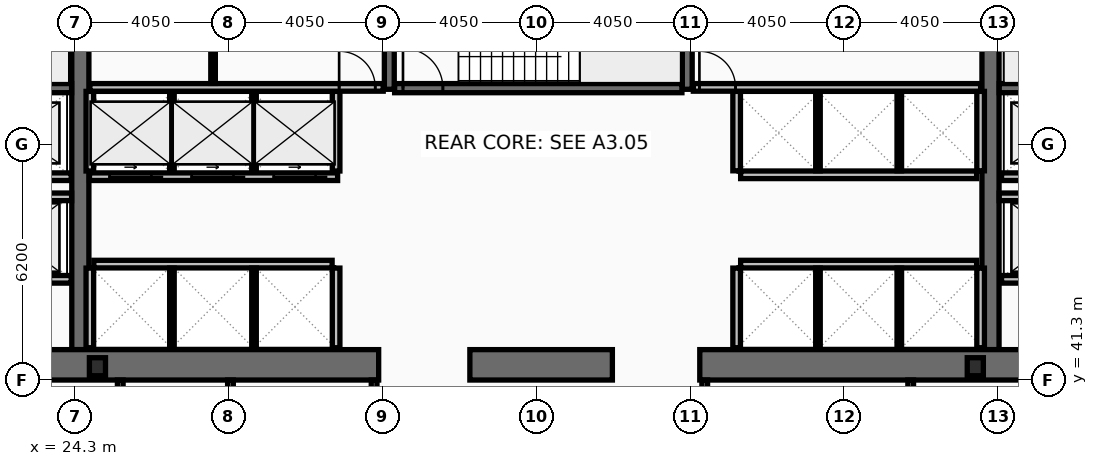
"""IFC4 building model, lengths in metres.
Left out: names, types, materials, properties, quantities, classifications, styles, units other than length and angle.
Written with IfcOpenShell. Run it as: python <this file> out.ifc"""

import sys

from ifc_helpers import new_model, si_unit, direction, frame, frame_2d, origin, origin_2d, place, context, subcontext, project, spatial, rectangle, i_section, extrude, element, fill, save


model = new_model("IFC4")
c1 = context("Model", 3, precision=1e-05, world=origin(), true_north=direction((0.0, 1.0)))
c2 = subcontext(c1, "Body", "Model", "MODEL_VIEW")
j1 = project(units=[si_unit("LENGTHUNIT", "METRE"), si_unit("PLANEANGLEUNIT", "RADIAN")], contexts=[c1])
p1 = place(None, origin())
s1 = spatial("IfcSite", under=j1, at=p1, CompositionType="ELEMENT")
p2 = place(p1, origin())
s2 = spatial("IfcBuilding", under=s1, at=p2, CompositionType="ELEMENT")
p3 = place(p2, frame((0.0, 0.0, 81.8)))
s3 = spatial("IfcBuildingStorey", under=s2, at=p3, CompositionType="ELEMENT", Elevation=81.8)
for number, where, z_axis, x_axis in (
    (1, (24.45, 42.1, 0.0), (0.0, 0.0, 1.0), (0.0, 1.0, 0.0)),
    (2, (48.4, 42.1, 0.0), (0.0, 0.0, 1.0), (0.0, 1.0, 0.0)),
):
    element("IfcWall", number, at=place(p3, frame(where, z_axis=z_axis, x_axis=x_axis)), inside=s3, PredefinedType="SHEAR", context=c2, shape_type="SweptSolid", body=[
        extrude(rectangle(XDim=10.8, YDim=0.45, at=frame_2d((5.4, 0.0))), origin(), (0.0, 0.0, 1.0), 3.78),
    ])
p4 = place(p3, frame((32.3, 41.7, 0.0), z_axis=(0.0, 0.0, 1.0), x_axis=(-1.0, 0.0, 0.0)))
e3 = element("IfcWall", 3, at=p4, inside=s3, PredefinedType="SHEAR", context=c2, shape_type="SweptSolid", body=[
    extrude(rectangle(XDim=11.45, YDim=0.8, at=frame_2d((5.725, 0.0))), origin(), (0.0, 0.0, 1.0), 3.78),
])
p5 = place(p3, frame((38.45, 41.7, 0.0), z_axis=(0.0, 0.0, 1.0), x_axis=(-1.0, 0.0, 0.0)))
e4 = element("IfcWall", 4, at=p5, inside=s3, PredefinedType="SHEAR", context=c2, shape_type="SweptSolid", body=[
    extrude(rectangle(XDim=3.75, YDim=0.8, at=frame_2d((1.875, 0.0))), origin(), (0.0, 0.0, 1.0), 3.78),
])
p6 = place(p3, frame((52.05, 41.7, 0.0), z_axis=(0.0, 0.0, 1.0), x_axis=(-1.0, 0.0, 0.0)))
e5 = element("IfcWall", 5, at=p6, inside=s3, PredefinedType="SHEAR", context=c2, shape_type="SweptSolid", body=[
    extrude(rectangle(XDim=11.3, YDim=0.8, at=frame_2d((5.65, 0.0))), origin(), (0.0, 0.0, 1.0), 3.78),
])
for number, where, z_axis, x_axis in (
    (6, (32.58, 48.95, 0.0), (0.0, 0.0, 1.0), (0.0, 1.0, 0.0)),
    (7, (40.42, 48.95, 0.0), (0.0, 0.0, 1.0), (0.0, 1.0, 0.0)),
):
    element("IfcWall", number, at=place(p3, frame(where, z_axis=z_axis, x_axis=x_axis)), inside=s3, PredefinedType="SHEAR", context=c2, shape_type="SweptSolid", body=[
        extrude(rectangle(XDim=3.95, YDim=0.26, at=frame_2d((1.975, 0.0))), origin(), (0.0, 0.0, 1.0), 3.78),
    ])
p7 = place(p3, frame((17.0, 48.98, 0.0), z_axis=(0.0, 0.0, 1.0), x_axis=(1.0, 0.0, 0.0)))
e8 = element("IfcWall", 8, at=p7, inside=s3, PredefinedType="SHEAR", context=c2, shape_type="SweptSolid", body=[
    extrude(rectangle(XDim=7.22, YDim=0.24, at=frame_2d((3.61, 0.0))), origin(), (0.0, 0.0, 1.0), 3.78),
])
p8 = place(p7, frame((0.22, 0.0, 0.0)))
e9 = element("IfcOpeningElement", 9, at=p8, cuts=e8, PredefinedType="OPENING", context=c2, shape_type="SweptSolid", body=[
    extrude(rectangle(XDim=1.05, YDim=2.15, at=frame_2d((0.525, 1.075))), frame((0.0, 0.13, 0.0), z_axis=(0.0, -1.0, 0.0), x_axis=(1.0, 0.0, 0.0)), (0.0, 0.0, 1.0), 0.26),
])
p9 = place(p3, frame((48.63, 48.98, 0.0), z_axis=(0.0, 0.0, 1.0), x_axis=(1.0, 0.0, 0.0)))
e10 = element("IfcWall", 10, at=p9, inside=s3, PredefinedType="SHEAR", context=c2, shape_type="SweptSolid", body=[
    extrude(rectangle(XDim=7.27, YDim=0.24, at=frame_2d((3.635, 0.0))), origin(), (0.0, 0.0, 1.0), 3.78),
])
p10 = place(p9, frame((6.0, 0.0, 0.0)))
e11 = element("IfcOpeningElement", 11, at=p10, cuts=e10, PredefinedType="OPENING", context=c2, shape_type="SweptSolid", body=[
    extrude(rectangle(XDim=1.05, YDim=2.15, at=frame_2d((0.525, 1.075))), frame((0.0, 0.13, 0.0), z_axis=(0.0, -1.0, 0.0), x_axis=(1.0, 0.0, 0.0)), (0.0, 0.0, 1.0), 0.26),
])
p11 = place(p3, frame((32.72, 48.98, 0.0), z_axis=(0.0, 0.0, 1.0), x_axis=(1.0, 0.0, 0.0)))
e12 = element("IfcWall", 12, at=p11, inside=s3, PredefinedType="SHEAR", context=c2, shape_type="SweptSolid", body=[
    extrude(rectangle(XDim=7.56, YDim=0.24, at=frame_2d((3.78, 0.0))), origin(), (0.0, 0.0, 1.0), 3.78),
])
p12 = place(p11, frame((0.22, 0.0, 0.0)))
e13 = element("IfcOpeningElement", 13, at=p12, cuts=e12, PredefinedType="OPENING", context=c2, shape_type="SweptSolid", body=[
    extrude(rectangle(XDim=1.05, YDim=2.15, at=frame_2d((0.525, 1.075))), frame((0.0, 0.13, 0.0), z_axis=(0.0, -1.0, 0.0), x_axis=(1.0, 0.0, 0.0)), (0.0, 0.0, 1.0), 0.26),
])
for number, where, z_axis, x_axis in (
    (14, (24.9, 41.65, 0.0), (0.0, 0.0, 1.0), (1.0, 0.0, 0.0)),
    (15, (48.0, 41.65, 0.0), (0.0, 0.0, 1.0), (1.0, 0.0, 0.0)),
):
    element("IfcColumn", number, at=place(p3, frame(where, z_axis=z_axis, x_axis=x_axis)), inside=s3, PredefinedType="COLUMN", context=c2, shape_type="SweptSolid", body=[
        extrude(i_section(OverallWidth=0.424, OverallDepth=0.474, WebThickness=0.048, FlangeThickness=0.077, at=origin_2d()), origin(), (0.0, 0.0, 1.0), 4.0),
    ])
p13 = place(p3, frame((51.61, 43.95, 0.0), z_axis=(0.0, 0.0, 1.0), x_axis=(-1.0, 0.0, 0.0)))
e16 = element("IfcWall", 16, at=p13, inside=s3, PredefinedType="PARTITIONING", context=c2, shape_type="SweptSolid", body=[
    extrude(rectangle(XDim=2.92, YDim=0.2, at=frame_2d((1.46, 0.0))), origin(), (0.0, 0.0, 1.0), 3.78),
])
p14 = place(p13, frame((0.81, 0.0, 0.0)))
e17 = element("IfcOpeningElement", 17, at=p14, cuts=e16, PredefinedType="OPENING", context=c2, shape_type="SweptSolid", body=[
    extrude(rectangle(XDim=1.3, YDim=2.18, at=frame_2d((0.65, 1.09))), frame((0.0, 0.11, 0.0), z_axis=(0.0, -1.0, 0.0), x_axis=(1.0, 0.0, 0.0)), (0.0, 0.0, 1.0), 0.22),
])
p15 = place(p3, frame((24.21, 43.95, 0.0), z_axis=(0.0, 0.0, 1.0), x_axis=(-1.0, 0.0, 0.0)))
e18 = element("IfcWall", 18, at=p15, inside=s3, PredefinedType="PARTITIONING", context=c2, shape_type="SweptSolid", body=[
    extrude(rectangle(XDim=2.97, YDim=0.2, at=frame_2d((1.485, 0.0))), origin(), (0.0, 0.0, 1.0), 3.78),
])
p16 = place(p15, frame((0.86, 0.0, 0.0)))
e19 = element("IfcOpeningElement", 19, at=p16, cuts=e18, PredefinedType="OPENING", context=c2, shape_type="SweptSolid", body=[
    extrude(rectangle(XDim=1.3, YDim=2.18, at=frame_2d((0.65, 1.09))), frame((0.0, 0.11, 0.0), z_axis=(0.0, -1.0, 0.0), x_axis=(1.0, 0.0, 0.0)), (0.0, 0.0, 1.0), 0.22),
])
p17 = place(p3, frame((51.61, 46.65, 0.0), z_axis=(0.0, 0.0, 1.0), x_axis=(-1.0, 0.0, 0.0)))
e20 = element("IfcWall", 20, at=p17, inside=s3, PredefinedType="PARTITIONING", context=c2, shape_type="SweptSolid", body=[
    extrude(rectangle(XDim=2.92, YDim=0.2, at=frame_2d((1.46, 0.0))), origin(), (0.0, 0.0, 1.0), 3.78),
])
p18 = place(p17, frame((0.86, 0.0, 0.0)))
e21 = element("IfcOpeningElement", 21, at=p18, cuts=e20, PredefinedType="OPENING", context=c2, shape_type="SweptSolid", body=[
    extrude(rectangle(XDim=1.2, YDim=2.18, at=frame_2d((0.6, 1.09))), frame((0.0, 0.11, 0.0), z_axis=(0.0, -1.0, 0.0), x_axis=(1.0, 0.0, 0.0)), (0.0, 0.0, 1.0), 0.22),
])
p19 = place(p3, frame((24.21, 46.65, 0.0), z_axis=(0.0, 0.0, 1.0), x_axis=(-1.0, 0.0, 0.0)))
e22 = element("IfcWall", 22, at=p19, inside=s3, PredefinedType="PARTITIONING", context=c2, shape_type="SweptSolid", body=[
    extrude(rectangle(XDim=2.97, YDim=0.2, at=frame_2d((1.485, 0.0))), origin(), (0.0, 0.0, 1.0), 3.78),
])
p20 = place(p19, frame((0.91, 0.0, 0.0)))
e23 = element("IfcOpeningElement", 23, at=p20, cuts=e22, PredefinedType="OPENING", context=c2, shape_type="SweptSolid", body=[
    extrude(rectangle(XDim=1.2, YDim=2.18, at=frame_2d((0.6, 1.09))), frame((0.0, 0.11, 0.0), z_axis=(0.0, -1.0, 0.0), x_axis=(1.0, 0.0, 0.0)), (0.0, 0.0, 1.0), 0.22),
])
p21 = place(p3, frame((31.22, 46.65, 0.0), z_axis=(0.0, 0.0, 1.0), x_axis=(-1.0, 0.0, 0.0)))
e24 = element("IfcWall", 24, at=p21, inside=s3, PredefinedType="PARTITIONING", context=c2, shape_type="SweptSolid", body=[
    extrude(rectangle(XDim=6.53, YDim=0.2, at=frame_2d((3.265, 0.0))), origin(), (0.0, 0.0, 1.0), 3.78),
])
p22 = place(p21, frame((4.9, 0.0, 0.0)))
e25 = element("IfcOpeningElement", 25, at=p22, cuts=e24, PredefinedType="OPENING", context=c2, shape_type="SweptSolid", body=[
    extrude(rectangle(XDim=1.1, YDim=2.18, at=frame_2d((0.55, 1.09))), frame((0.0, 0.11, 0.0), z_axis=(0.0, -1.0, 0.0), x_axis=(1.0, 0.0, 0.0)), (0.0, 0.0, 1.0), 0.22),
])
p23 = place(p21, frame((2.74, 0.0, 0.0)))
e26 = element("IfcOpeningElement", 26, at=p23, cuts=e24, PredefinedType="OPENING", context=c2, shape_type="SweptSolid", body=[
    extrude(rectangle(XDim=1.1, YDim=2.18, at=frame_2d((0.55, 1.09))), frame((0.0, 0.11, 0.0), z_axis=(0.0, -1.0, 0.0), x_axis=(1.0, 0.0, 0.0)), (0.0, 0.0, 1.0), 0.22),
])
p24 = place(p21, frame((0.58, 0.0, 0.0)))
e27 = element("IfcOpeningElement", 27, at=p24, cuts=e24, PredefinedType="OPENING", context=c2, shape_type="SweptSolid", body=[
    extrude(rectangle(XDim=1.1, YDim=2.18, at=frame_2d((0.55, 1.09))), frame((0.0, 0.11, 0.0), z_axis=(0.0, -1.0, 0.0), x_axis=(1.0, 0.0, 0.0)), (0.0, 0.0, 1.0), 0.22),
])
p25 = place(p3, frame((21.2, 46.12, 0.0), z_axis=(0.0, 0.0, 1.0), x_axis=(1.0, 0.0, 0.0)))
e28 = element("IfcWall", 28, at=p25, inside=s3, PredefinedType="PARTITIONING", context=c2, shape_type="SweptSolid", body=[
    extrude(rectangle(XDim=3.02, YDim=0.2, at=frame_2d((1.51, 0.0))), origin(), (0.0, 0.0, 1.0), 3.78),
])
p26 = place(p3, frame((48.63, 46.12, 0.0), z_axis=(0.0, 0.0, 1.0), x_axis=(1.0, 0.0, 0.0)))
e29 = element("IfcWall", 29, at=p26, inside=s3, PredefinedType="PARTITIONING", context=c2, shape_type="SweptSolid", body=[
    extrude(rectangle(XDim=3.07, YDim=0.2, at=frame_2d((1.535, 0.0))), origin(), (0.0, 0.0, 1.0), 3.78),
])
for number, where, z_axis, x_axis in (
    (30, (24.7, 46.8, 0.0), (0.0, 0.0, 1.0), (0.0, 1.0, 0.0)),
    (31, (31.18, 46.8, 0.0), (0.0, 0.0, 1.0), (0.0, 1.0, 0.0)),
):
    element("IfcWall", number, at=place(p3, frame(where, z_axis=z_axis, x_axis=x_axis)), inside=s3, PredefinedType="PARTITIONING", context=c2, shape_type="SweptSolid", body=[
        extrude(rectangle(XDim=2.095, YDim=0.2, at=frame_2d((1.047, 0.0))), origin(), (0.0, 0.0, 1.0), 3.78),
    ])
for number, where, z_axis, x_axis in (
    (32, (26.86, 46.8, 0.0), (0.0, 0.0, 1.0), (0.0, 1.0, 0.0)),
    (33, (29.02, 46.8, 0.0), (0.0, 0.0, 1.0), (0.0, 1.0, 0.0)),
):
    element("IfcWall", number, at=place(p3, frame(where, z_axis=z_axis, x_axis=x_axis)), inside=s3, PredefinedType="PARTITIONING", context=c2, shape_type="SweptSolid", body=[
        extrude(rectangle(XDim=2.095, YDim=0.12, at=frame_2d((1.047, 0.0))), origin(), (0.0, 0.0, 1.0), 3.78),
    ])
p27 = place(p3, frame((24.805, 44.35, 0.0), z_axis=(0.0, 0.0, 1.0), x_axis=(1.0, 0.0, 0.0)))
e34 = element("IfcWall", 34, at=p27, inside=s3, PredefinedType="PARTITIONING", context=c2, shape_type="SweptSolid", body=[
    extrude(rectangle(XDim=6.27, YDim=0.2, at=frame_2d((3.135, 0.0))), origin(), (0.0, 0.0, 1.0), 3.78),
])
for number, where, z_axis, x_axis in (
    (35, (24.7, 42.15, 0.0), (0.0, 0.0, 1.0), (0.0, 1.0, 0.0)),
    (36, (31.18, 42.15, 0.0), (0.0, 0.0, 1.0), (0.0, 1.0, 0.0)),
):
    element("IfcWall", number, at=place(p3, frame(where, z_axis=z_axis, x_axis=x_axis)), inside=s3, PredefinedType="PARTITIONING", context=c2, shape_type="SweptSolid", body=[
        extrude(rectangle(XDim=2.095, YDim=0.2, at=frame_2d((1.048, 0.0))), origin(), (0.0, 0.0, 1.0), 3.78),
    ])
for number, where, z_axis, x_axis in (
    (37, (26.86, 42.15, 0.0), (0.0, 0.0, 1.0), (0.0, 1.0, 0.0)),
    (38, (29.02, 42.15, 0.0), (0.0, 0.0, 1.0), (0.0, 1.0, 0.0)),
):
    element("IfcWall", number, at=place(p3, frame(where, z_axis=z_axis, x_axis=x_axis)), inside=s3, PredefinedType="PARTITIONING", context=c2, shape_type="SweptSolid", body=[
        extrude(rectangle(XDim=2.095, YDim=0.12, at=frame_2d((1.048, 0.0))), origin(), (0.0, 0.0, 1.0), 3.78),
    ])
p28 = place(p3, frame((41.825, 46.7, 0.0), z_axis=(0.0, 0.0, 1.0), x_axis=(1.0, 0.0, 0.0)))
e39 = element("IfcWall", 39, at=p28, inside=s3, PredefinedType="PARTITIONING", context=c2, shape_type="SweptSolid", body=[
    extrude(rectangle(XDim=6.21, YDim=0.2, at=frame_2d((3.105, 0.0))), origin(), (0.0, 0.0, 1.0), 3.78),
])
for number, where, z_axis, x_axis in (
    (40, (41.72, 46.805, 0.0), (0.0, 0.0, 1.0), (0.0, 1.0, 0.0)),
    (41, (48.14, 46.805, 0.0), (0.0, 0.0, 1.0), (0.0, 1.0, 0.0)),
):
    element("IfcWall", number, at=place(p3, frame(where, z_axis=z_axis, x_axis=x_axis)), inside=s3, PredefinedType="PARTITIONING", context=c2, shape_type="SweptSolid", body=[
        extrude(rectangle(XDim=2.09, YDim=0.2, at=frame_2d((1.045, 0.0))), origin(), (0.0, 0.0, 1.0), 3.78),
    ])
for number, where, z_axis, x_axis in (
    (42, (43.86, 46.805, 0.0), (0.0, 0.0, 1.0), (0.0, 1.0, 0.0)),
    (43, (46.0, 46.805, 0.0), (0.0, 0.0, 1.0), (0.0, 1.0, 0.0)),
):
    element("IfcWall", number, at=place(p3, frame(where, z_axis=z_axis, x_axis=x_axis)), inside=s3, PredefinedType="PARTITIONING", context=c2, shape_type="SweptSolid", body=[
        extrude(rectangle(XDim=2.09, YDim=0.12, at=frame_2d((1.045, 0.0))), origin(), (0.0, 0.0, 1.0), 3.78),
    ])
p29 = place(p3, frame((41.825, 44.35, 0.0), z_axis=(0.0, 0.0, 1.0), x_axis=(1.0, 0.0, 0.0)))
e44 = element("IfcWall", 44, at=p29, inside=s3, PredefinedType="PARTITIONING", context=c2, shape_type="SweptSolid", body=[
    extrude(rectangle(XDim=6.21, YDim=0.2, at=frame_2d((3.105, 0.0))), origin(), (0.0, 0.0, 1.0), 3.78),
])
for number, where, z_axis, x_axis in (
    (45, (41.72, 42.15, 0.0), (0.0, 0.0, 1.0), (0.0, 1.0, 0.0)),
    (46, (48.14, 42.15, 0.0), (0.0, 0.0, 1.0), (0.0, 1.0, 0.0)),
):
    element("IfcWall", number, at=place(p3, frame(where, z_axis=z_axis, x_axis=x_axis)), inside=s3, PredefinedType="PARTITIONING", context=c2, shape_type="SweptSolid", body=[
        extrude(rectangle(XDim=2.095, YDim=0.2, at=frame_2d((1.048, 0.0))), origin(), (0.0, 0.0, 1.0), 3.78),
    ])
for number, where, z_axis, x_axis in (
    (47, (43.86, 42.15, 0.0), (0.0, 0.0, 1.0), (0.0, 1.0, 0.0)),
    (48, (46.0, 42.15, 0.0), (0.0, 0.0, 1.0), (0.0, 1.0, 0.0)),
):
    element("IfcWall", number, at=place(p3, frame(where, z_axis=z_axis, x_axis=x_axis)), inside=s3, PredefinedType="PARTITIONING", context=c2, shape_type="SweptSolid", body=[
        extrude(rectangle(XDim=2.095, YDim=0.12, at=frame_2d((1.048, 0.0))), origin(), (0.0, 0.0, 1.0), 3.78),
    ])
p30 = place(p3, frame((24.7, 49.0, 0.0), z_axis=(0.0, 0.0, 1.0), x_axis=(1.0, 0.0, 0.0)))
e49 = element("IfcWall", 49, at=p30, inside=s3, PredefinedType="PARTITIONING", context=c2, shape_type="SweptSolid", body=[
    extrude(rectangle(XDim=7.72, YDim=0.2, at=frame_2d((3.86, 0.0))), origin(), (0.0, 0.0, 1.0), 3.78),
])
p31 = place(p30, frame((6.56, 0.0, 0.0)))
e50 = element("IfcOpeningElement", 50, at=p31, cuts=e49, PredefinedType="OPENING", context=c2, shape_type="SweptSolid", body=[
    extrude(rectangle(XDim=0.95, YDim=2.1, at=frame_2d((0.475, 1.05))), frame((0.0, 0.11, 0.0), z_axis=(0.0, -1.0, 0.0), x_axis=(1.0, 0.0, 0.0)), (0.0, 0.0, 1.0), 0.22),
])
p32 = place(p3, frame((27.942, 49.105, 0.0), z_axis=(0.0, 0.0, 1.0), x_axis=(0.0, 1.0, 0.0)))
e51 = element("IfcWall", 51, at=p32, inside=s3, PredefinedType="PARTITIONING", context=c2, shape_type="SweptSolid", body=[
    extrude(rectangle(XDim=3.69, YDim=0.12, at=frame_2d((1.845, 0.0))), origin(), (0.0, 0.0, 1.0), 3.78),
])
p33 = place(p32, frame((1.05, 0.0, 0.0)))
e52 = element("IfcOpeningElement", 52, at=p33, cuts=e51, PredefinedType="OPENING", context=c2, shape_type="SweptSolid", body=[
    extrude(rectangle(XDim=0.9, YDim=2.05, at=frame_2d((0.45, 1.025))), frame((0.0, 0.07, 0.0), z_axis=(0.0, -1.0, 0.0), x_axis=(1.0, 0.0, 0.0)), (0.0, 0.0, 1.0), 0.14),
])
p34 = place(p3, frame((40.58, 49.0, 0.0), z_axis=(0.0, 0.0, 1.0), x_axis=(1.0, 0.0, 0.0)))
e53 = element("IfcWall", 53, at=p34, inside=s3, PredefinedType="PARTITIONING", context=c2, shape_type="SweptSolid", body=[
    extrude(rectangle(XDim=7.56, YDim=0.2, at=frame_2d((3.78, 0.0))), origin(), (0.0, 0.0, 1.0), 3.78),
])
p35 = place(p34, frame((0.16, 0.0, 0.0)))
e54 = element("IfcOpeningElement", 54, at=p35, cuts=e53, PredefinedType="OPENING", context=c2, shape_type="SweptSolid", body=[
    extrude(rectangle(XDim=0.95, YDim=2.1, at=frame_2d((0.475, 1.05))), frame((0.0, 0.11, 0.0), z_axis=(0.0, -1.0, 0.0), x_axis=(1.0, 0.0, 0.0)), (0.0, 0.0, 1.0), 0.22),
])
for number, where, z_axis, x_axis in (
    (55, (25.5, 38.28, 0.0), (0.0, 0.0, 1.0), (0.0, 1.0, 0.0)),
    (56, (28.4, 38.28, 0.0), (0.0, 0.0, 1.0), (0.0, 1.0, 0.0)),
    (57, (32.18, 38.28, 0.0), (0.0, 0.0, 1.0), (0.0, 1.0, 0.0)),
    (58, (40.88, 38.28, 0.0), (0.0, 0.0, 1.0), (0.0, 1.0, 0.0)),
    (59, (46.3, 38.28, 0.0), (0.0, 0.0, 1.0), (0.0, 1.0, 0.0)),
):
    element("IfcWall", number, at=place(p3, frame(where, z_axis=z_axis, x_axis=x_axis)), inside=s3, PredefinedType="PARTITIONING", context=c2, shape_type="SweptSolid", body=[
        extrude(rectangle(XDim=3.02, YDim=0.15, at=frame_2d((1.51, 0.0))), origin(), (0.0, 0.0, 1.0), 3.78),
    ])
p36 = place(p12, origin())
e60 = element("IfcDoor", 60, at=p36, inside=s3, OperationType="SINGLE_SWING_LEFT", PredefinedType="DOOR", context=c2, shape_type="SweptSolid", body=[
    extrude(rectangle(XDim=1.05, YDim=2.15, at=frame_2d((0.525, 1.075))), frame((0.0, 0.025, 0.0), z_axis=(0.0, -1.0, 0.0), x_axis=(1.0, 0.0, 0.0)), (0.0, 0.0, 1.0), 0.05),
])
fill(e13, e60)
p37 = place(p22, origin())
e61 = element("IfcDoor", 61, at=p37, inside=s3, OperationType="SLIDING_TO_LEFT", PredefinedType="DOOR", context=c2, shape_type="SweptSolid", body=[
    extrude(rectangle(XDim=1.1, YDim=2.18, at=frame_2d((0.55, 1.09))), frame((0.0, 0.025, 0.0), z_axis=(0.0, -1.0, 0.0), x_axis=(1.0, 0.0, 0.0)), (0.0, 0.0, 1.0), 0.05),
])
fill(e25, e61)
p38 = place(p23, origin())
e62 = element("IfcDoor", 62, at=p38, inside=s3, OperationType="SLIDING_TO_LEFT", PredefinedType="DOOR", context=c2, shape_type="SweptSolid", body=[
    extrude(rectangle(XDim=1.1, YDim=2.18, at=frame_2d((0.55, 1.09))), frame((0.0, 0.025, 0.0), z_axis=(0.0, -1.0, 0.0), x_axis=(1.0, 0.0, 0.0)), (0.0, 0.0, 1.0), 0.05),
])
fill(e26, e62)
p39 = place(p24, origin())
e63 = element("IfcDoor", 63, at=p39, inside=s3, OperationType="SLIDING_TO_LEFT", PredefinedType="DOOR", context=c2, shape_type="SweptSolid", body=[
    extrude(rectangle(XDim=1.1, YDim=2.18, at=frame_2d((0.55, 1.09))), frame((0.0, 0.025, 0.0), z_axis=(0.0, -1.0, 0.0), x_axis=(1.0, 0.0, 0.0)), (0.0, 0.0, 1.0), 0.05),
])
fill(e27, e63)
p40 = place(p31, origin())
e64 = element("IfcDoor", 64, at=p40, inside=s3, OperationType="SINGLE_SWING_LEFT", PredefinedType="DOOR", context=c2, shape_type="SweptSolid", body=[
    extrude(rectangle(XDim=0.95, YDim=2.1, at=frame_2d((0.475, 1.05))), frame((0.0, 0.025, 0.0), z_axis=(0.0, -1.0, 0.0), x_axis=(1.0, 0.0, 0.0)), (0.0, 0.0, 1.0), 0.05),
])
fill(e50, e64)
p41 = place(p35, origin())
e65 = element("IfcDoor", 65, at=p41, inside=s3, OperationType="SINGLE_SWING_LEFT", PredefinedType="DOOR", context=c2, shape_type="SweptSolid", body=[
    extrude(rectangle(XDim=0.95, YDim=2.1, at=frame_2d((0.475, 1.05))), frame((0.0, 0.025, 0.0), z_axis=(0.0, -1.0, 0.0), x_axis=(1.0, 0.0, 0.0)), (0.0, 0.0, 1.0), 0.05),
])
fill(e54, e65)
save(model, sys.argv[1])
